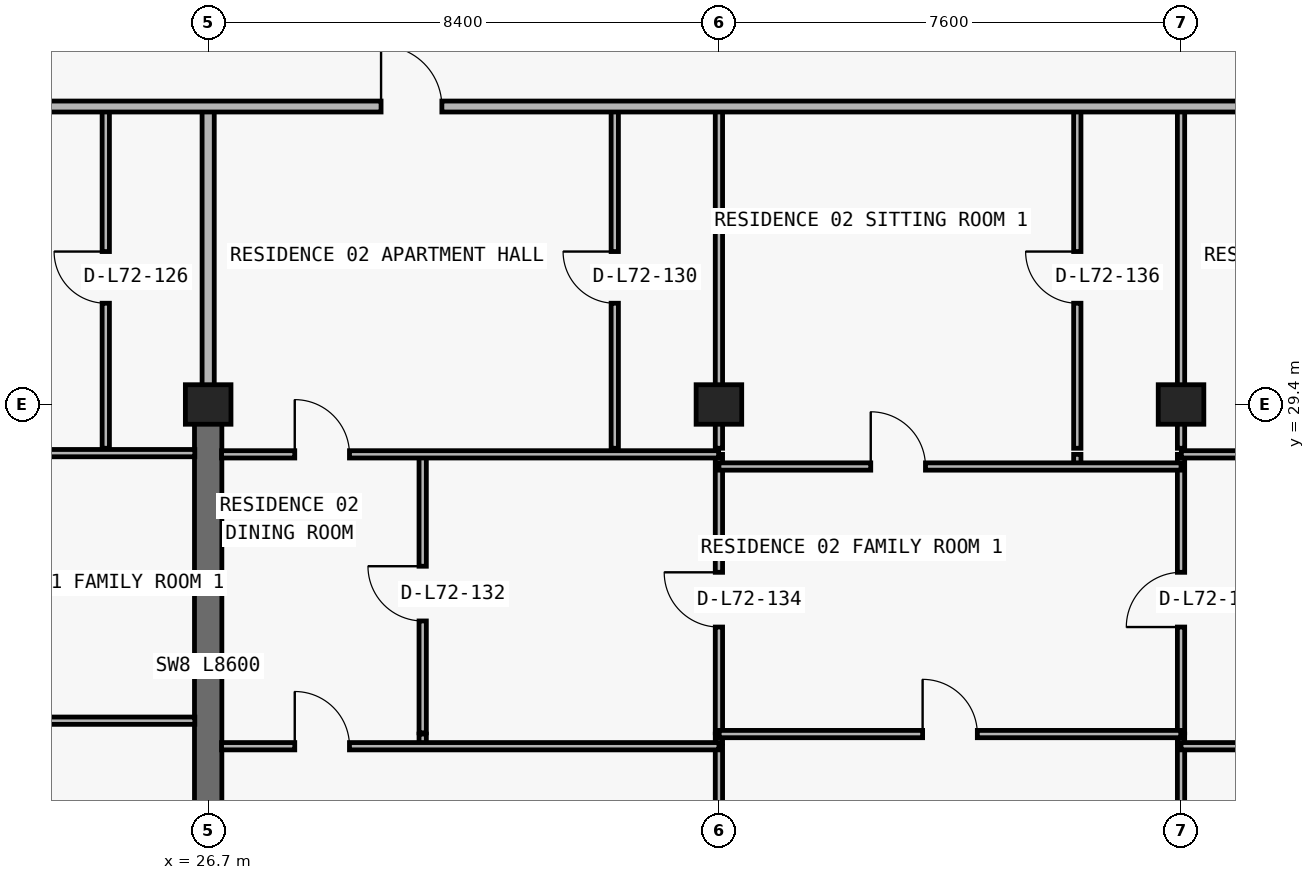
"""IFC4 building model, lengths in metres.
Left out: names, types, materials, properties, quantities, classifications, styles, units other than length and angle.
Written with IfcOpenShell. Run it as: python <this file> out.ifc"""

import sys

from ifc_helpers import new_model, si_unit, direction, frame, frame_2d, origin, origin_2d, place, context, subcontext, project, spatial, rectangle, extrude, element, fill, save


model = new_model("IFC4")
c1 = context("Model", 3, precision=1e-05, world=origin(), true_north=direction((0.0, 1.0)))
c2 = subcontext(c1, "Body", "Model", "MODEL_VIEW")
j1 = project(units=[si_unit("LENGTHUNIT", "METRE"), si_unit("PLANEANGLEUNIT", "RADIAN")], contexts=[c1])
p1 = place(None, origin())
s1 = spatial("IfcSite", under=j1, at=p1, CompositionType="ELEMENT")
p2 = place(p1, origin())
s2 = spatial("IfcBuilding", under=s1, at=p2, CompositionType="ELEMENT")
p3 = place(p2, frame((0.0, 0.0, 256.2)))
s3 = spatial("IfcBuildingStorey", under=s2, at=p3, CompositionType="ELEMENT", Elevation=256.2)
for number, where, z_axis, x_axis in (
    (1, (26.7, 29.4, 0.0), (0.0, 0.0, 1.0), (1.0, 0.0, 0.0)),
    (2, (35.1, 29.4, 0.0), (0.0, 0.0, 1.0), (1.0, 0.0, 0.0)),
    (3, (42.7, 29.4, 0.0), (0.0, 0.0, 1.0), (1.0, 0.0, 0.0)),
):
    element("IfcColumn", number, at=place(p3, frame(where, z_axis=z_axis, x_axis=x_axis)), inside=s3, PredefinedType="COLUMN", context=c2, shape_type="SweptSolid", body=[
        extrude(rectangle(XDim=0.75, YDim=0.65, at=origin_2d()), origin(), (0.0, 0.0, 1.0), 3.05),
    ])
p4 = place(p3, frame((26.7, 20.8, 0.0), z_axis=(0.0, 0.0, 1.0), x_axis=(0.0, 1.0, 0.0)))
e4 = element("IfcWall", 4, at=p4, inside=s3, PredefinedType="SHEAR", context=c2, shape_type="SweptSolid", body=[
    extrude(rectangle(XDim=8.6, YDim=0.45, at=frame_2d((4.3, 0.0))), origin(), (0.0, 0.0, 1.0), 3.05),
])
p5 = place(p3, frame((25.016, 28.68, 0.0), z_axis=(0.0, 0.0, 1.0), x_axis=(0.0, 1.0, 0.0)))
e5 = element("IfcWall", 5, at=p5, inside=s3, PredefinedType="PARTITIONING", context=c2, shape_type="SweptSolid", body=[
    extrude(rectangle(XDim=5.62, YDim=0.12, at=frame_2d((2.81, 0.0))), origin(), (0.0, 0.0, 1.0), 3.05),
])
p6 = place(p5, frame((2.385, 0.0, 0.0)))
e6 = element("IfcOpeningElement", 6, at=p6, cuts=e5, PredefinedType="OPENING", context=c2, shape_type="SweptSolid", body=[
    extrude(rectangle(XDim=0.85, YDim=2.1, at=frame_2d((0.425, 1.05))), frame((0.0, 0.07, 0.0), z_axis=(0.0, -1.0, 0.0), x_axis=(1.0, 0.0, 0.0)), (0.0, 0.0, 1.0), 0.14),
])
p7 = place(p3, frame((26.7, 29.405, 0.0), z_axis=(0.0, 0.0, 1.0), x_axis=(0.0, 1.0, 0.0)))
e7 = element("IfcWall", 7, at=p7, inside=s3, PredefinedType="PARTITIONING", context=c2, shape_type="SweptSolid", body=[
    extrude(rectangle(XDim=4.895, YDim=0.2, at=frame_2d((2.448, 0.0))), origin(), (0.0, 0.0, 1.0), 2.335),
])
p8 = place(p3, frame((30.228, 23.83, 0.0), z_axis=(0.0, 0.0, 1.0), x_axis=(0.0, 1.0, 0.0)))
e8 = element("IfcWall", 8, at=p8, inside=s3, PredefinedType="PARTITIONING", context=c2, shape_type="SweptSolid", body=[
    extrude(rectangle(XDim=0.15, YDim=0.12, at=frame_2d((0.075, 0.0))), origin(), (0.0, 0.0, 1.0), 3.05),
])
p9 = place(p3, frame((30.228, 24.0, 0.0), z_axis=(0.0, 0.0, 1.0), x_axis=(0.0, 1.0, 0.0)))
e9 = element("IfcWall", 9, at=p9, inside=s3, PredefinedType="PARTITIONING", context=c2, shape_type="SweptSolid", body=[
    extrude(rectangle(XDim=4.58, YDim=0.12, at=frame_2d((2.29, 0.0))), origin(), (0.0, 0.0, 1.0), 3.05),
])
p10 = place(p9, frame((1.84, 0.0, 0.0)))
e10 = element("IfcOpeningElement", 10, at=p10, cuts=e9, PredefinedType="OPENING", context=c2, shape_type="SweptSolid", body=[
    extrude(rectangle(XDim=0.9, YDim=2.15, at=frame_2d((0.45, 1.075))), frame((0.0, 0.07, 0.0), z_axis=(0.0, -1.0, 0.0), x_axis=(1.0, 0.0, 0.0)), (0.0, 0.0, 1.0), 0.14),
])
p11 = place(p3, frame((33.387, 28.68, 0.0), z_axis=(0.0, 0.0, 1.0), x_axis=(0.0, 1.0, 0.0)))
e11 = element("IfcWall", 11, at=p11, inside=s3, PredefinedType="PARTITIONING", context=c2, shape_type="SweptSolid", body=[
    extrude(rectangle(XDim=5.62, YDim=0.12, at=frame_2d((2.81, 0.0))), origin(), (0.0, 0.0, 1.0), 3.05),
])
p12 = place(p11, frame((2.385, 0.0, 0.0)))
e12 = element("IfcOpeningElement", 12, at=p12, cuts=e11, PredefinedType="OPENING", context=c2, shape_type="SweptSolid", body=[
    extrude(rectangle(XDim=0.85, YDim=2.1, at=frame_2d((0.425, 1.05))), frame((0.0, 0.07, 0.0), z_axis=(0.0, -1.0, 0.0), x_axis=(1.0, 0.0, 0.0)), (0.0, 0.0, 1.0), 0.14),
])
p13 = place(p3, frame((35.1, 13.34, 0.0), z_axis=(0.0, 0.0, 1.0), x_axis=(0.0, 1.0, 0.0)))
e13 = element("IfcWall", 13, at=p13, inside=s3, PredefinedType="PARTITIONING", context=c2, shape_type="SweptSolid", body=[
    extrude(rectangle(XDim=10.44, YDim=0.12, at=frame_2d((5.22, 0.0))), origin(), (0.0, 0.0, 1.0), 2.263),
])
p14 = place(p3, frame((35.1, 23.83, 0.0), z_axis=(0.0, 0.0, 1.0), x_axis=(0.0, 1.0, 0.0)))
e14 = element("IfcWall", 14, at=p14, inside=s3, PredefinedType="PARTITIONING", context=c2, shape_type="SweptSolid", body=[
    extrude(rectangle(XDim=0.15, YDim=0.12, at=frame_2d((0.075, 0.0))), origin(), (0.0, 0.0, 1.0), 2.263),
])
p15 = place(p3, frame((35.1, 24.0, 0.0), z_axis=(0.0, 0.0, 1.0), x_axis=(0.0, 1.0, 0.0)))
e15 = element("IfcWall", 15, at=p15, inside=s3, PredefinedType="PARTITIONING", context=c2, shape_type="SweptSolid", body=[
    extrude(rectangle(XDim=4.58, YDim=0.12, at=frame_2d((2.29, 0.0))), origin(), (0.0, 0.0, 1.0), 2.263),
])
p16 = place(p15, frame((1.74, 0.0, 0.0)))
e16 = element("IfcOpeningElement", 16, at=p16, cuts=e15, PredefinedType="OPENING", context=c2, shape_type="SweptSolid", body=[
    extrude(rectangle(XDim=0.9, YDim=2.15, at=frame_2d((0.45, 1.075))), frame((0.0, 0.07, 0.0), z_axis=(0.0, -1.0, 0.0), x_axis=(1.0, 0.0, 0.0)), (0.0, 0.0, 1.0), 0.14),
])
p17 = place(p3, frame((35.1, 28.68, 0.0), z_axis=(0.0, 0.0, 1.0), x_axis=(0.0, 1.0, 0.0)))
e17 = element("IfcWall", 17, at=p17, inside=s3, PredefinedType="PARTITIONING", context=c2, shape_type="SweptSolid", body=[
    extrude(rectangle(XDim=5.62, YDim=0.12, at=frame_2d((2.81, 0.0))), origin(), (0.0, 0.0, 1.0), 2.263),
])
p18 = place(p3, frame((40.994, 28.38, 0.0), z_axis=(0.0, 0.0, 1.0), x_axis=(0.0, 1.0, 0.0)))
e18 = element("IfcWall", 18, at=p18, inside=s3, PredefinedType="PARTITIONING", context=c2, shape_type="SweptSolid", body=[
    extrude(rectangle(XDim=0.2, YDim=0.12, at=frame_2d((0.1, 0.0))), origin(), (0.0, 0.0, 1.0), 3.05),
])
p19 = place(p3, frame((40.994, 28.68, 0.0), z_axis=(0.0, 0.0, 1.0), x_axis=(0.0, 1.0, 0.0)))
e19 = element("IfcWall", 19, at=p19, inside=s3, PredefinedType="PARTITIONING", context=c2, shape_type="SweptSolid", body=[
    extrude(rectangle(XDim=5.62, YDim=0.12, at=frame_2d((2.81, 0.0))), origin(), (0.0, 0.0, 1.0), 3.05),
])
p20 = place(p19, frame((2.385, 0.0, 0.0)))
e20 = element("IfcOpeningElement", 20, at=p20, cuts=e19, PredefinedType="OPENING", context=c2, shape_type="SweptSolid", body=[
    extrude(rectangle(XDim=0.85, YDim=2.1, at=frame_2d((0.425, 1.05))), frame((0.0, 0.07, 0.0), z_axis=(0.0, -1.0, 0.0), x_axis=(1.0, 0.0, 0.0)), (0.0, 0.0, 1.0), 0.14),
])
p21 = place(p3, frame((42.7, 13.34, 0.0), z_axis=(0.0, 0.0, 1.0), x_axis=(0.0, 1.0, 0.0)))
e21 = element("IfcWall", 21, at=p21, inside=s3, PredefinedType="PARTITIONING", context=c2, shape_type="SweptSolid", body=[
    extrude(rectangle(XDim=10.44, YDim=0.12, at=frame_2d((5.22, 0.0))), origin(), (0.0, 0.0, 1.0), 2.263),
])
p22 = place(p3, frame((42.7, 23.83, 0.0), z_axis=(0.0, 0.0, 1.0), x_axis=(0.0, 1.0, 0.0)))
e22 = element("IfcWall", 22, at=p22, inside=s3, PredefinedType="PARTITIONING", context=c2, shape_type="SweptSolid", body=[
    extrude(rectangle(XDim=0.15, YDim=0.12, at=frame_2d((0.075, 0.0))), origin(), (0.0, 0.0, 1.0), 2.263),
])
p23 = place(p3, frame((42.7, 24.0, 0.0), z_axis=(0.0, 0.0, 1.0), x_axis=(0.0, 1.0, 0.0)))
e23 = element("IfcWall", 23, at=p23, inside=s3, PredefinedType="PARTITIONING", context=c2, shape_type="SweptSolid", body=[
    extrude(rectangle(XDim=4.58, YDim=0.12, at=frame_2d((2.29, 0.0))), origin(), (0.0, 0.0, 1.0), 2.263),
])
p24 = place(p23, frame((1.74, 0.0, 0.0)))
e24 = element("IfcOpeningElement", 24, at=p24, cuts=e23, PredefinedType="OPENING", context=c2, shape_type="SweptSolid", body=[
    extrude(rectangle(XDim=0.9, YDim=2.15, at=frame_2d((0.45, 1.075))), frame((0.0, 0.07, 0.0), z_axis=(0.0, -1.0, 0.0), x_axis=(1.0, 0.0, 0.0)), (0.0, 0.0, 1.0), 0.14),
])
p25 = place(p3, frame((42.7, 28.68, 0.0), z_axis=(0.0, 0.0, 1.0), x_axis=(0.0, 1.0, 0.0)))
e25 = element("IfcWall", 25, at=p25, inside=s3, PredefinedType="PARTITIONING", context=c2, shape_type="SweptSolid", body=[
    extrude(rectangle(XDim=5.62, YDim=0.12, at=frame_2d((2.81, 0.0))), origin(), (0.0, 0.0, 1.0), 2.263),
])
p26 = place(p3, frame((26.92, 23.78, 0.0), z_axis=(0.0, 0.0, 1.0), x_axis=(1.0, 0.0, 0.0)))
e26 = element("IfcWall", 26, at=p26, inside=s3, PredefinedType="PARTITIONING", context=c2, shape_type="SweptSolid", body=[
    extrude(rectangle(XDim=8.18, YDim=0.12, at=frame_2d((4.09, 0.0))), origin(), (0.0, 0.0, 1.0), 3.05),
])
p27 = place(p26, frame((1.204, 0.0, 0.0)))
e27 = element("IfcOpeningElement", 27, at=p27, cuts=e26, PredefinedType="OPENING", context=c2, shape_type="SweptSolid", body=[
    extrude(rectangle(XDim=0.9, YDim=2.15, at=frame_2d((0.45, 1.075))), frame((0.0, 0.07, 0.0), z_axis=(0.0, -1.0, 0.0), x_axis=(1.0, 0.0, 0.0)), (0.0, 0.0, 1.0), 0.14),
])
p28 = place(p3, frame((42.7, 23.78, 0.0), z_axis=(0.0, 0.0, 1.0), x_axis=(1.0, 0.0, 0.0)))
e28 = element("IfcWall", 28, at=p28, inside=s3, PredefinedType="PARTITIONING", context=c2, shape_type="SweptSolid", body=[
    extrude(rectangle(XDim=8.18, YDim=0.12, at=frame_2d((4.09, 0.0))), origin(), (0.0, 0.0, 1.0), 3.05),
])
p29 = place(p28, frame((3.64, 0.0, 0.0)))
e29 = element("IfcOpeningElement", 29, at=p29, cuts=e28, PredefinedType="OPENING", context=c2, shape_type="SweptSolid", body=[
    extrude(rectangle(XDim=0.9, YDim=2.15, at=frame_2d((0.45, 1.075))), frame((0.0, 0.07, 0.0), z_axis=(0.0, -1.0, 0.0), x_axis=(1.0, 0.0, 0.0)), (0.0, 0.0, 1.0), 0.14),
])
p30 = place(p3, frame((35.105, 23.98, 0.0), z_axis=(0.0, 0.0, 1.0), x_axis=(1.0, 0.0, 0.0)))
e30 = element("IfcWall", 30, at=p30, inside=s3, PredefinedType="PARTITIONING", context=c2, shape_type="SweptSolid", body=[
    extrude(rectangle(XDim=7.59, YDim=0.12, at=frame_2d((3.795, 0.0))), origin(), (0.0, 0.0, 1.0), 3.05),
])
p31 = place(p30, frame((3.345, 0.0, 0.0)))
e31 = element("IfcOpeningElement", 31, at=p31, cuts=e30, PredefinedType="OPENING", context=c2, shape_type="SweptSolid", body=[
    extrude(rectangle(XDim=0.9, YDim=2.15, at=frame_2d((0.45, 1.075))), frame((0.0, 0.07, 0.0), z_axis=(0.0, -1.0, 0.0), x_axis=(1.0, 0.0, 0.0)), (0.0, 0.0, 1.0), 0.14),
])
p32 = place(p3, frame((18.305, 24.2, 0.0), z_axis=(0.0, 0.0, 1.0), x_axis=(1.0, 0.0, 0.0)))
e32 = element("IfcWall", 32, at=p32, inside=s3, PredefinedType="PARTITIONING", context=c2, shape_type="SweptSolid", body=[
    extrude(rectangle(XDim=8.175, YDim=0.12, at=frame_2d((4.087, 0.0))), origin(), (0.0, 0.0, 1.0), 3.05),
])
p33 = place(p32, frame((3.637, 0.0, 0.0)))
e33 = element("IfcOpeningElement", 33, at=p33, cuts=e32, PredefinedType="OPENING", context=c2, shape_type="SweptSolid", body=[
    extrude(rectangle(XDim=0.9, YDim=2.15, at=frame_2d((0.45, 1.075))), frame((0.0, 0.07, 0.0), z_axis=(0.0, -1.0, 0.0), x_axis=(1.0, 0.0, 0.0)), (0.0, 0.0, 1.0), 0.14),
])
p34 = place(p3, frame((35.1, 28.38, 0.0), z_axis=(0.0, 0.0, 1.0), x_axis=(1.0, 0.0, 0.0)))
e34 = element("IfcWall", 34, at=p34, inside=s3, PredefinedType="PARTITIONING", context=c2, shape_type="SweptSolid", body=[
    extrude(rectangle(XDim=7.6, YDim=0.12, at=frame_2d((3.8, 0.0))), origin(), (0.0, 0.0, 1.0), 3.05),
])
p35 = place(p34, frame((2.497, 0.0, 0.0)))
e35 = element("IfcOpeningElement", 35, at=p35, cuts=e34, PredefinedType="OPENING", context=c2, shape_type="SweptSolid", body=[
    extrude(rectangle(XDim=0.9, YDim=2.15, at=frame_2d((0.45, 1.075))), frame((0.0, 0.07, 0.0), z_axis=(0.0, -1.0, 0.0), x_axis=(1.0, 0.0, 0.0)), (0.0, 0.0, 1.0), 0.14),
])
p36 = place(p3, frame((26.92, 28.58, 0.0), z_axis=(0.0, 0.0, 1.0), x_axis=(1.0, 0.0, 0.0)))
e36 = element("IfcWall", 36, at=p36, inside=s3, PredefinedType="PARTITIONING", context=c2, shape_type="SweptSolid", body=[
    extrude(rectangle(XDim=8.175, YDim=0.12, at=frame_2d((4.087, 0.0))), origin(), (0.0, 0.0, 1.0), 3.05),
])
p37 = place(p36, frame((1.204, 0.0, 0.0)))
e37 = element("IfcOpeningElement", 37, at=p37, cuts=e36, PredefinedType="OPENING", context=c2, shape_type="SweptSolid", body=[
    extrude(rectangle(XDim=0.9, YDim=2.15, at=frame_2d((0.45, 1.075))), frame((0.0, 0.07, 0.0), z_axis=(0.0, -1.0, 0.0), x_axis=(1.0, 0.0, 0.0)), (0.0, 0.0, 1.0), 0.14),
])
p38 = place(p3, frame((42.705, 28.58, 0.0), z_axis=(0.0, 0.0, 1.0), x_axis=(1.0, 0.0, 0.0)))
e38 = element("IfcWall", 38, at=p38, inside=s3, PredefinedType="PARTITIONING", context=c2, shape_type="SweptSolid", body=[
    extrude(rectangle(XDim=8.175, YDim=0.12, at=frame_2d((4.087, 0.0))), origin(), (0.0, 0.0, 1.0), 3.05),
])
p39 = place(p38, frame((2.908, 0.0, 0.0)))
e39 = element("IfcOpeningElement", 39, at=p39, cuts=e38, PredefinedType="OPENING", context=c2, shape_type="SweptSolid", body=[
    extrude(rectangle(XDim=0.9, YDim=2.15, at=frame_2d((0.45, 1.075))), frame((0.0, 0.07, 0.0), z_axis=(0.0, -1.0, 0.0), x_axis=(1.0, 0.0, 0.0)), (0.0, 0.0, 1.0), 0.14),
])
p40 = place(p3, frame((18.3, 28.6, 0.0), z_axis=(0.0, 0.0, 1.0), x_axis=(1.0, 0.0, 0.0)))
e40 = element("IfcWall", 40, at=p40, inside=s3, PredefinedType="PARTITIONING", context=c2, shape_type="SweptSolid", body=[
    extrude(rectangle(XDim=8.18, YDim=0.12, at=frame_2d((4.09, 0.0))), origin(), (0.0, 0.0, 1.0), 3.05),
])
p41 = place(p40, frame((2.908, 0.0, 0.0)))
e41 = element("IfcOpeningElement", 41, at=p41, cuts=e40, PredefinedType="OPENING", context=c2, shape_type="SweptSolid", body=[
    extrude(rectangle(XDim=0.9, YDim=2.15, at=frame_2d((0.45, 1.075))), frame((0.0, 0.07, 0.0), z_axis=(0.0, -1.0, 0.0), x_axis=(1.0, 0.0, 0.0)), (0.0, 0.0, 1.0), 0.14),
])
p42 = place(p3, frame((12.105, 34.3, 0.0), z_axis=(0.0, 0.0, 1.0), x_axis=(1.0, 0.0, 0.0)))
e42 = element("IfcWall", 42, at=p42, inside=s3, PredefinedType="PARTITIONING", context=c2, shape_type="SweptSolid", body=[
    extrude(rectangle(XDim=53.595, YDim=0.18, at=frame_2d((26.797, 0.0))), origin(), (0.0, 0.0, 1.0), 3.05),
])
p43 = place(p42, frame((1.661, 0.0, 0.0)))
e43 = element("IfcOpeningElement", 43, at=p43, cuts=e42, PredefinedType="OPENING", context=c2, shape_type="SweptSolid", body=[
    extrude(rectangle(XDim=1.0, YDim=2.2, at=frame_2d((0.5, 1.1))), frame((0.0, 0.1, 0.0), z_axis=(0.0, -1.0, 0.0), x_axis=(1.0, 0.0, 0.0)), (0.0, 0.0, 1.0), 0.2),
])
p44 = place(p42, frame((17.438, 0.0, 0.0)))
e44 = element("IfcOpeningElement", 44, at=p44, cuts=e42, PredefinedType="OPENING", context=c2, shape_type="SweptSolid", body=[
    extrude(rectangle(XDim=1.0, YDim=2.2, at=frame_2d((0.5, 1.1))), frame((0.0, 0.1, 0.0), z_axis=(0.0, -1.0, 0.0), x_axis=(1.0, 0.0, 0.0)), (0.0, 0.0, 1.0), 0.2),
])
p45 = place(p42, frame((41.727, 0.0, 0.0)))
e45 = element("IfcOpeningElement", 45, at=p45, cuts=e42, PredefinedType="OPENING", context=c2, shape_type="SweptSolid", body=[
    extrude(rectangle(XDim=1.0, YDim=2.2, at=frame_2d((0.5, 1.1))), frame((0.0, 0.1, 0.0), z_axis=(0.0, -1.0, 0.0), x_axis=(1.0, 0.0, 0.0)), (0.0, 0.0, 1.0), 0.2),
])
p46 = place(p42, frame((49.141, 0.0, 0.0)))
e46 = element("IfcOpeningElement", 46, at=p46, cuts=e42, PredefinedType="OPENING", context=c2, shape_type="SweptSolid", body=[
    extrude(rectangle(XDim=1.0, YDim=2.2, at=frame_2d((0.5, 1.1))), frame((0.0, 0.1, 0.0), z_axis=(0.0, -1.0, 0.0), x_axis=(1.0, 0.0, 0.0)), (0.0, 0.0, 1.0), 0.2),
])
p47 = place(p6, origin())
e47 = element("IfcDoor", 47, at=p47, inside=s3, OperationType="SINGLE_SWING_RIGHT", PredefinedType="DOOR", context=c2, shape_type="SweptSolid", body=[
    extrude(rectangle(XDim=0.85, YDim=2.1, at=frame_2d((0.425, 1.05))), frame((0.0, 0.025, 0.0), z_axis=(0.0, -1.0, 0.0), x_axis=(1.0, 0.0, 0.0)), (0.0, 0.0, 1.0), 0.05),
])
fill(e6, e47)
p48 = place(p44, origin())
e48 = element("IfcDoor", 48, at=p48, inside=s3, OperationType="SINGLE_SWING_LEFT", PredefinedType="DOOR", context=c2, shape_type="SweptSolid", body=[
    extrude(rectangle(XDim=1.0, YDim=2.2, at=frame_2d((0.5, 1.1))), frame((0.0, 0.025, 0.0), z_axis=(0.0, -1.0, 0.0), x_axis=(1.0, 0.0, 0.0)), (0.0, 0.0, 1.0), 0.05),
])
fill(e44, e48)
p49 = place(p12, origin())
e49 = element("IfcDoor", 49, at=p49, inside=s3, OperationType="SINGLE_SWING_RIGHT", PredefinedType="DOOR", context=c2, shape_type="SweptSolid", body=[
    extrude(rectangle(XDim=0.85, YDim=2.1, at=frame_2d((0.425, 1.05))), frame((0.0, 0.025, 0.0), z_axis=(0.0, -1.0, 0.0), x_axis=(1.0, 0.0, 0.0)), (0.0, 0.0, 1.0), 0.05),
])
fill(e12, e49)
p50 = place(p37, origin())
e50 = element("IfcDoor", 50, at=p50, inside=s3, OperationType="SINGLE_SWING_LEFT", PredefinedType="DOOR", context=c2, shape_type="SweptSolid", body=[
    extrude(rectangle(XDim=0.9, YDim=2.15, at=frame_2d((0.45, 1.075))), frame((0.0, 0.025, 0.0), z_axis=(0.0, -1.0, 0.0), x_axis=(1.0, 0.0, 0.0)), (0.0, 0.0, 1.0), 0.05),
])
fill(e37, e50)
p51 = place(p10, origin())
e51 = element("IfcDoor", 51, at=p51, inside=s3, OperationType="SINGLE_SWING_RIGHT", PredefinedType="DOOR", context=c2, shape_type="SweptSolid", body=[
    extrude(rectangle(XDim=0.9, YDim=2.15, at=frame_2d((0.45, 1.075))), frame((0.0, 0.025, 0.0), z_axis=(0.0, -1.0, 0.0), x_axis=(1.0, 0.0, 0.0)), (0.0, 0.0, 1.0), 0.05),
])
fill(e10, e51)
p52 = place(p27, origin())
e52 = element("IfcDoor", 52, at=p52, inside=s3, OperationType="SINGLE_SWING_LEFT", PredefinedType="DOOR", context=c2, shape_type="SweptSolid", body=[
    extrude(rectangle(XDim=0.9, YDim=2.15, at=frame_2d((0.45, 1.075))), frame((0.0, 0.025, 0.0), z_axis=(0.0, -1.0, 0.0), x_axis=(1.0, 0.0, 0.0)), (0.0, 0.0, 1.0), 0.05),
])
fill(e27, e52)
p53 = place(p16, origin())
e53 = element("IfcDoor", 53, at=p53, inside=s3, OperationType="SINGLE_SWING_RIGHT", PredefinedType="DOOR", context=c2, shape_type="SweptSolid", body=[
    extrude(rectangle(XDim=0.9, YDim=2.15, at=frame_2d((0.45, 1.075))), frame((0.0, 0.025, 0.0), z_axis=(0.0, -1.0, 0.0), x_axis=(1.0, 0.0, 0.0)), (0.0, 0.0, 1.0), 0.05),
])
fill(e16, e53)
p54 = place(p35, origin())
e54 = element("IfcDoor", 54, at=p54, inside=s3, OperationType="SINGLE_SWING_LEFT", PredefinedType="DOOR", context=c2, shape_type="SweptSolid", body=[
    extrude(rectangle(XDim=0.9, YDim=2.15, at=frame_2d((0.45, 1.075))), frame((0.0, 0.025, 0.0), z_axis=(0.0, -1.0, 0.0), x_axis=(1.0, 0.0, 0.0)), (0.0, 0.0, 1.0), 0.05),
])
fill(e35, e54)
p55 = place(p20, origin())
e55 = element("IfcDoor", 55, at=p55, inside=s3, OperationType="SINGLE_SWING_RIGHT", PredefinedType="DOOR", context=c2, shape_type="SweptSolid", body=[
    extrude(rectangle(XDim=0.85, YDim=2.1, at=frame_2d((0.425, 1.05))), frame((0.0, 0.025, 0.0), z_axis=(0.0, -1.0, 0.0), x_axis=(1.0, 0.0, 0.0)), (0.0, 0.0, 1.0), 0.05),
])
fill(e20, e55)
p56 = place(p31, origin())
e56 = element("IfcDoor", 56, at=p56, inside=s3, OperationType="SINGLE_SWING_LEFT", PredefinedType="DOOR", context=c2, shape_type="SweptSolid", body=[
    extrude(rectangle(XDim=0.9, YDim=2.15, at=frame_2d((0.45, 1.075))), frame((0.0, 0.025, 0.0), z_axis=(0.0, -1.0, 0.0), x_axis=(1.0, 0.0, 0.0)), (0.0, 0.0, 1.0), 0.05),
])
fill(e31, e56)
p57 = place(p24, origin())
e57 = element("IfcDoor", 57, at=p57, inside=s3, OperationType="SINGLE_SWING_LEFT", PredefinedType="DOOR", context=c2, shape_type="SweptSolid", body=[
    extrude(rectangle(XDim=0.9, YDim=2.15, at=frame_2d((0.45, 1.075))), frame((0.0, 0.025, 0.0), z_axis=(0.0, -1.0, 0.0), x_axis=(1.0, 0.0, 0.0)), (0.0, 0.0, 1.0), 0.05),
])
fill(e24, e57)
save(model, sys.argv[1])
